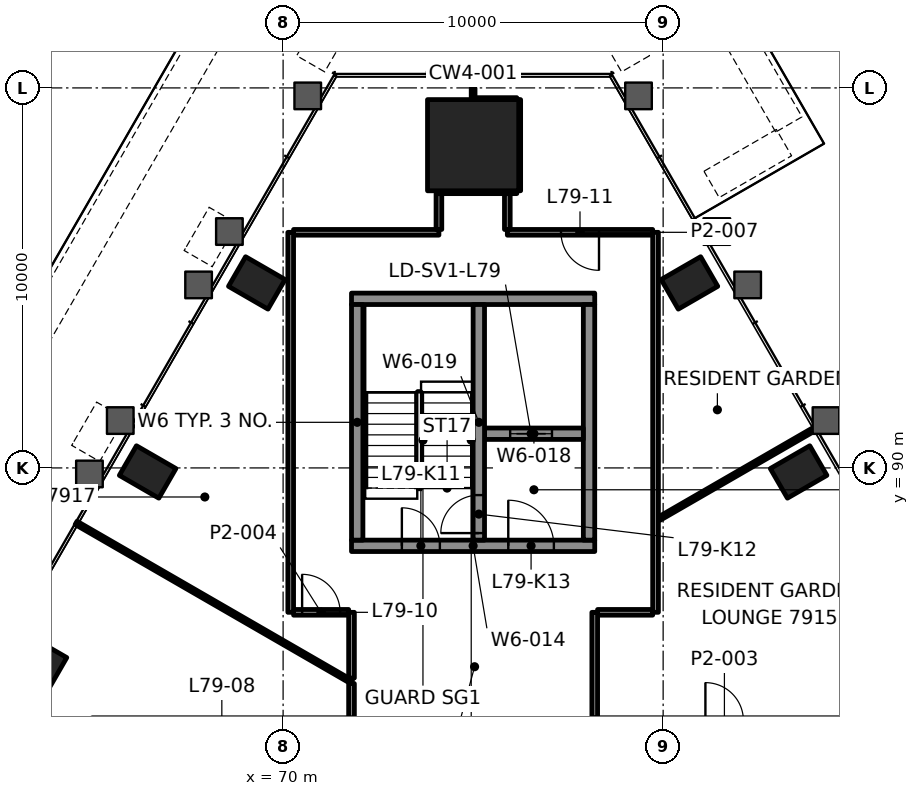
"""IFC4 building model, lengths in metres.
Left out: names, types, materials, properties, quantities, classifications, styles, units other than length and angle.
Written with IfcOpenShell. Run it as: python <this file> out.ifc"""

import sys

from ifc_helpers import new_model, si_unit, direction, frame, frame_2d, origin, origin_2d, place, context, subcontext, project, spatial, rectangle, hollow_rectangle, extrude, element, fill, save


model = new_model("IFC4")
c1 = context("Model", 3, precision=1e-05, world=origin(), true_north=direction((0.0, 1.0)))
c2 = subcontext(c1, "Body", "Model", "MODEL_VIEW")
j1 = project(units=[si_unit("LENGTHUNIT", "METRE"), si_unit("PLANEANGLEUNIT", "RADIAN")], contexts=[c1])
p1 = place(None, origin())
s1 = spatial("IfcSite", under=j1, at=p1, CompositionType="ELEMENT")
p2 = place(p1, origin())
s2 = spatial("IfcBuilding", under=s1, at=p2, CompositionType="ELEMENT")
p3 = place(p2, frame((0.0, 0.0, 323.1)))
s3 = spatial("IfcBuildingStorey", under=s2, at=p3, CompositionType="ELEMENT", Elevation=323.1)
p4 = place(p3, frame((75.0, 98.493, 0.0), z_axis=(0.0, 0.0, 1.0), x_axis=(-1.0, 0.0, 0.0)))
e1 = element("IfcColumn", 1, at=p4, inside=s3, PredefinedType="COLUMN", context=c2, shape_type="SweptSolid", body=[
    extrude(rectangle(XDim=2.4, YDim=2.4, at=origin_2d()), origin(), (0.0, 0.0, 1.0), 3.5),
])
for number, where, z_axis, x_axis in (
    (2, (83.565, 89.894, -0.0), (0.0, 0.0, 1.0), (-0.5, 0.866, 0.0)),
    (3, (80.693, 94.868, -0.0), (0.0, 0.0, 1.0), (-0.5, 0.866, 0.0)),
    (4, (69.307, 94.868, -0.0), (0.0, 0.0, 1.0), (-0.5, -0.866, 0.0)),
    (5, (66.435, 89.894, -0.0), (0.0, 0.0, 1.0), (-0.5, -0.866, 0.0)),
    (6, (63.563, 84.919, -0.0), (0.0, 0.0, 1.0), (-0.5, -0.866, 0.0)),
):
    element("IfcColumn", number, at=place(p3, frame(where, z_axis=z_axis, x_axis=x_axis)), inside=s3, PredefinedType="COLUMN", context=c2, shape_type="SweptSolid", body=[
        extrude(hollow_rectangle(XDim=0.9, YDim=1.2, WallThickness=0.06, at=origin_2d()), origin(), (0.0, 0.0, 1.0), 3.5),
    ])
p5 = place(p3, frame((71.8, 87.95, 0.0), z_axis=(0.0, 0.0, 1.0), x_axis=(1.0, 0.0, 0.0)))
e7 = element("IfcWall", 7, at=p5, inside=s3, PredefinedType="SHEAR", context=c2, shape_type="SweptSolid", body=[
    extrude(rectangle(XDim=6.4, YDim=0.3, at=frame_2d((3.2, 0.0))), origin(), (0.0, 0.0, 1.0), 3.2),
])
p6 = place(p5, frame((1.325, 0.0, 0.0)))
e8 = element("IfcOpeningElement", 8, at=p6, cuts=e7, PredefinedType="OPENING", context=c2, shape_type="SweptSolid", body=[
    extrude(rectangle(XDim=1.0, YDim=2.1, at=frame_2d((0.5, 1.05))), frame((0.0, 0.16, 0.0), z_axis=(0.0, -1.0, 0.0), x_axis=(1.0, 0.0, 0.0)), (0.0, 0.0, 1.0), 0.32),
])
p7 = place(p5, frame((4.125, 0.0, 0.0)))
e9 = element("IfcOpeningElement", 9, at=p7, cuts=e7, PredefinedType="OPENING", context=c2, shape_type="SweptSolid", body=[
    extrude(rectangle(XDim=1.2, YDim=2.1, at=frame_2d((0.6, 1.05))), frame((0.0, 0.16, 0.0), z_axis=(0.0, -1.0, 0.0), x_axis=(1.0, 0.0, 0.0)), (0.0, 0.0, 1.0), 0.32),
])
p8 = place(p3, frame((71.8, 94.45, 0.0), z_axis=(0.0, 0.0, 1.0), x_axis=(1.0, 0.0, 0.0)))
e10 = element("IfcWall", 10, at=p8, inside=s3, PredefinedType="SHEAR", context=c2, shape_type="SweptSolid", body=[
    extrude(rectangle(XDim=6.4, YDim=0.3, at=frame_2d((3.2, 0.0))), origin(), (0.0, 0.0, 1.0), 3.2),
])
for number, where, z_axis, x_axis in (
    (11, (71.95, 88.1, 0.0), (0.0, 0.0, 1.0), (0.0, 1.0, 0.0)),
    (12, (78.05, 88.1, 0.0), (0.0, 0.0, 1.0), (0.0, 1.0, 0.0)),
):
    element("IfcWall", number, at=place(p3, frame(where, z_axis=z_axis, x_axis=x_axis)), inside=s3, PredefinedType="SHEAR", context=c2, shape_type="SweptSolid", body=[
        extrude(rectangle(XDim=6.2, YDim=0.3, at=frame_2d((3.1, 0.0))), origin(), (0.0, 0.0, 1.0), 3.2),
    ])
p9 = place(p3, frame((75.3, 90.9, 0.0), z_axis=(0.0, 0.0, 1.0), x_axis=(1.0, 0.0, 0.0)))
e13 = element("IfcWall", 13, at=p9, inside=s3, PredefinedType="SHEAR", context=c2, shape_type="SweptSolid", body=[
    extrude(rectangle(XDim=2.6, YDim=0.3, at=frame_2d((1.3, 0.0))), origin(), (0.0, 0.0, 1.0), 3.2),
])
p10 = place(p9, frame((0.675, 0.0, 0.0)))
e14 = element("IfcOpeningElement", 14, at=p10, cuts=e13, PredefinedType="OPENING", context=c2, shape_type="SweptSolid", body=[
    extrude(rectangle(XDim=1.1, YDim=2.1, at=frame_2d((0.55, 1.05))), frame((0.0, 0.16, 0.0), z_axis=(0.0, -1.0, 0.0), x_axis=(1.0, 0.0, 0.0)), (0.0, 0.0, 1.0), 0.32),
])
p11 = place(p3, frame((75.15, 88.1, 0.0), z_axis=(0.0, 0.0, 1.0), x_axis=(0.0, 1.0, 0.0)))
e15 = element("IfcWall", 15, at=p11, inside=s3, PredefinedType="SHEAR", context=c2, shape_type="SweptSolid", body=[
    extrude(rectangle(XDim=6.2, YDim=0.3, at=frame_2d((3.1, 0.0))), origin(), (0.0, 0.0, 1.0), 3.2),
])
p12 = place(p11, frame((0.185, 0.0, 0.0)))
e16 = element("IfcOpeningElement", 16, at=p12, cuts=e15, PredefinedType="OPENING", context=c2, shape_type="SweptSolid", body=[
    extrude(rectangle(XDim=1.0, YDim=2.1, at=frame_2d((0.5, 1.05))), frame((0.0, 0.16, 0.0), z_axis=(0.0, -1.0, 0.0), x_axis=(1.0, 0.0, 0.0)), (0.0, 0.0, 1.0), 0.32),
])
p13 = place(p3, frame((70.276, 86.2, 0.0), z_axis=(0.0, 0.0, 1.0), x_axis=(1.0, 0.0, 0.0)))
e17 = element("IfcWall", 17, at=p13, inside=s3, PredefinedType="PARTITIONING", context=c2, shape_type="SweptSolid", body=[
    extrude(rectangle(XDim=1.449, YDim=0.15, at=frame_2d((0.725, 0.0))), origin(), (0.0, 0.0, 1.0), 2.6),
])
p14 = place(p13, frame((0.225, 0.0, 0.0)))
e18 = element("IfcOpeningElement", 18, at=p14, cuts=e17, PredefinedType="OPENING", context=c2, shape_type="SweptSolid", body=[
    extrude(rectangle(XDim=1.0, YDim=2.1, at=frame_2d((0.5, 1.05))), frame((0.0, 0.085, 0.0), z_axis=(0.0, -1.0, 0.0), x_axis=(1.0, 0.0, 0.0)), (0.0, 0.0, 1.0), 0.17),
])
p15 = place(p3, frame((78.275, 86.2, 0.0), z_axis=(0.0, 0.0, 1.0), x_axis=(1.0, 0.0, 0.0)))
e19 = element("IfcWall", 19, at=p15, inside=s3, PredefinedType="PARTITIONING", context=c2, shape_type="SweptSolid", body=[
    extrude(rectangle(XDim=1.449, YDim=0.15, at=frame_2d((0.725, 0.0))), origin(), (0.0, 0.0, 1.0), 2.6),
])
p16 = place(p3, frame((70.276, 96.2, 0.0), z_axis=(0.0, 0.0, 1.0), x_axis=(1.0, 0.0, 0.0)))
e20 = element("IfcWall", 20, at=p16, inside=s3, PredefinedType="PARTITIONING", context=c2, shape_type="SweptSolid", body=[
    extrude(rectangle(XDim=3.824, YDim=0.15, at=frame_2d((1.912, 0.0))), origin(), (0.0, 0.0, 1.0), 2.6),
])
p17 = place(p3, frame((79.725, 96.2, 0.0), z_axis=(0.0, 0.0, 1.0), x_axis=(-1.0, 0.0, 0.0)))
e21 = element("IfcWall", 21, at=p17, inside=s3, PredefinedType="PARTITIONING", context=c2, shape_type="SweptSolid", body=[
    extrude(rectangle(XDim=3.825, YDim=0.15, at=frame_2d((1.912, 0.0))), origin(), (0.0, 0.0, 1.0), 2.6),
])
p18 = place(p17, frame((1.412, 0.0, 0.0)))
e22 = element("IfcOpeningElement", 22, at=p18, cuts=e21, PredefinedType="OPENING", context=c2, shape_type="SweptSolid", body=[
    extrude(rectangle(XDim=1.0, YDim=2.1, at=frame_2d((0.5, 1.05))), frame((0.0, 0.085, 0.0), z_axis=(0.0, -1.0, 0.0), x_axis=(1.0, 0.0, 0.0)), (0.0, 0.0, 1.0), 0.17),
])
p19 = place(p3, frame((74.101, 97.293, 0.0), z_axis=(0.0, 0.0, 1.0), x_axis=(1.0, 0.0, 0.0)))
e23 = element("IfcWall", 23, at=p19, inside=s3, PredefinedType="PARTITIONING", context=c2, shape_type="SweptSolid", body=[
    extrude(rectangle(XDim=2.049, YDim=0.15, at=frame_2d((1.024, 0.0))), origin(), (0.0, 0.0, 1.0), 2.597),
])
p20 = place(p3, frame((75.0, 99.693, 0.0), z_axis=(0.0, 0.0, 1.0), x_axis=(1.0, 0.0, 0.0)))
e24 = element("IfcWall", 24, at=p20, inside=s3, PredefinedType="PARTITIONING", context=c2, shape_type="SweptSolid", body=[
    extrude(rectangle(XDim=1.149, YDim=0.1, at=frame_2d((0.574, 0.0))), origin(), (0.0, 0.0, 1.0), 2.6),
])
p21 = place(p3, frame((79.901, 88.668, 0.0), z_axis=(0.0, 0.0, 1.0), x_axis=(0.866040813102, 0.499973309328, 0.0)))
e25 = element("IfcWall", 25, at=p21, inside=s3, PredefinedType="PARTITIONING", context=c2, shape_type="SweptSolid", body=[
    extrude(rectangle(XDim=4.746, YDim=0.1, at=frame_2d((2.373, 0.0))), origin(), (0.0, 0.0, 1.0), 2.6),
])
p22 = place(p3, frame((79.8, 86.2, 0.0), z_axis=(0.0, 0.0, 1.0), x_axis=(0.0, 1.0, 0.0)))
e26 = element("IfcWall", 26, at=p22, inside=s3, PredefinedType="PARTITIONING", context=c2, shape_type="SweptSolid", body=[
    extrude(rectangle(XDim=9.999, YDim=0.15, at=frame_2d((5.0, 0.0))), origin(), (0.0, 0.0, 1.0), 2.6),
])
p23 = place(p3, frame((78.2, 83.425, 0.0), z_axis=(0.0, 0.0, 1.0), x_axis=(0.0, 1.0, 0.0)))
e27 = element("IfcWall", 27, at=p23, inside=s3, PredefinedType="PARTITIONING", context=c2, shape_type="SweptSolid", body=[
    extrude(rectangle(XDim=2.775, YDim=0.15, at=frame_2d((1.387, 0.0))), origin(), (0.0, 0.0, 1.0), 2.6),
])
p24 = place(p3, frame((76.2, 97.293, 0.0), z_axis=(0.0, 0.0, 1.0), x_axis=(0.0, 1.0, 0.0)))
e28 = element("IfcWall", 28, at=p24, inside=s3, PredefinedType="PARTITIONING", context=c2, shape_type="SweptSolid", body=[
    extrude(rectangle(XDim=2.399, YDim=0.1, at=frame_2d((1.2, 0.0))), origin(), (0.0, 0.0, 1.0), 2.6),
])
p25 = place(p3, frame((75.9, 96.275, 0.0), z_axis=(0.0, 0.0, 1.0), x_axis=(0.0, 1.0, 0.0)))
e29 = element("IfcWall", 29, at=p25, inside=s3, PredefinedType="PARTITIONING", context=c2, shape_type="SweptSolid", body=[
    extrude(rectangle(XDim=0.943, YDim=0.15, at=frame_2d((0.471, 0.0))), origin(), (0.0, 0.0, 1.0), 2.6),
])
p26 = place(p3, frame((75.0, 99.743, 0.0), z_axis=(0.0, 0.0, 1.0), x_axis=(0.0, 1.0, 0.0)))
e30 = element("IfcWall", 30, at=p26, inside=s3, PredefinedType="PARTITIONING", context=c2, shape_type="SweptSolid", body=[
    extrude(rectangle(XDim=0.249, YDim=0.1, at=frame_2d((0.125, 0.0))), origin(), (0.0, 0.0, 1.0), 2.6),
])
p27 = place(p3, frame((74.1, 96.275, 0.0), z_axis=(0.0, 0.0, 1.0), x_axis=(0.0, 1.0, 0.0)))
e31 = element("IfcWall", 31, at=p27, inside=s3, PredefinedType="PARTITIONING", context=c2, shape_type="SweptSolid", body=[
    extrude(rectangle(XDim=0.942, YDim=0.15, at=frame_2d((0.471, 0.0))), origin(), (0.0, 0.0, 1.0), 2.6),
])
p28 = place(p3, frame((71.8, 83.425, 0.0), z_axis=(0.0, 0.0, 1.0), x_axis=(0.0, 1.0, 0.0)))
e32 = element("IfcWall", 32, at=p28, inside=s3, PredefinedType="PARTITIONING", context=c2, shape_type="SweptSolid", body=[
    extrude(rectangle(XDim=0.901, YDim=0.15, at=frame_2d((0.451, 0.0))), origin(), (0.0, 0.0, 1.0), 2.6),
])
p29 = place(p3, frame((70.2, 86.2, 0.0), z_axis=(0.0, 0.0, 1.0), x_axis=(0.0, 1.0, 0.0)))
e33 = element("IfcWall", 33, at=p29, inside=s3, PredefinedType="PARTITIONING", context=c2, shape_type="SweptSolid", body=[
    extrude(rectangle(XDim=9.999, YDim=0.15, at=frame_2d((5.0, 0.0))), origin(), (0.0, 0.0, 1.0), 2.6),
])
p30 = place(p3, frame((71.8, 84.369, 0.0), z_axis=(0.0, 0.0, 1.0), x_axis=(-0.866026229868, 0.499998569178, 0.0)))
e34 = element("IfcWall", 34, at=p30, inside=s3, PredefinedType="PARTITIONING", context=c2, shape_type="SweptSolid", body=[
    extrude(rectangle(XDim=8.368, YDim=0.1, at=frame_2d((4.184, 0.0))), origin(), (0.0, 0.0, 1.0), 2.588),
])
p31 = place(p3, frame((71.8, 84.47, 0.0), z_axis=(0.0, 0.0, 1.0), x_axis=(0.0, 1.0, 0.0)))
e35 = element("IfcWall", 35, at=p31, inside=s3, PredefinedType="PARTITIONING", context=c2, shape_type="SweptSolid", body=[
    extrude(rectangle(XDim=1.729, YDim=0.15, at=frame_2d((0.865, 0.0))), origin(), (0.0, 0.0, 1.0), 2.6),
])
p32 = place(p3, frame((81.274, 97.46, 0.0), z_axis=(0.0, 0.0, 1.0), x_axis=(0.866008176907, 0.50002983664, 0.0)))
e36 = element("IfcWall", 36, at=p32, inside=s3, PredefinedType="SOLIDWALL", context=c2, shape_type="SweptSolid", body=[
    extrude(rectangle(XDim=2.2, YDim=0.8, at=frame_2d((1.1, 0.0))), origin(), (0.0, 0.0, 1.0), 0.9),
])
p33 = place(p3, frame((83.308, 99.038, 0.0), z_axis=(0.0, 0.0, 1.0), x_axis=(-0.500015883528, 0.866016233231, 0.0)))
e37 = element("IfcWall", 37, at=p33, inside=s3, PredefinedType="SOLIDWALL", context=c2, shape_type="SweptSolid", body=[
    extrude(rectangle(XDim=4.849, YDim=0.8, at=frame_2d((2.425, 0.0))), origin(), (0.0, 0.0, 1.0), 0.9),
])
p34 = place(p3, frame((69.117, 103.238, 0.0), z_axis=(0.0, 0.0, 1.0), x_axis=(-0.500001437611, -0.866024573778, 0.0)))
e38 = element("IfcWall", 38, at=p34, inside=s3, PredefinedType="SOLIDWALL", context=c2, shape_type="SweptSolid", body=[
    extrude(rectangle(XDim=43.027, YDim=0.8, at=frame_2d((21.513, 0.0))), origin(), (0.0, 0.0, 1.0), 0.9),
])
p35 = place(p14, origin())
e39 = element("IfcDoor", 39, at=p35, inside=s3, OperationType="SINGLE_SWING_RIGHT", PredefinedType="DOOR", context=c2, shape_type="SweptSolid", body=[
    extrude(rectangle(XDim=1.0, YDim=2.1, at=frame_2d((0.5, 1.05))), frame((0.0, 0.025, 0.0), z_axis=(0.0, -1.0, 0.0), x_axis=(1.0, 0.0, 0.0)), (0.0, 0.0, 1.0), 0.05),
])
fill(e18, e39)
p36 = place(p18, origin())
e40 = element("IfcDoor", 40, at=p36, inside=s3, OperationType="SINGLE_SWING_RIGHT", PredefinedType="DOOR", context=c2, shape_type="SweptSolid", body=[
    extrude(rectangle(XDim=1.0, YDim=2.1, at=frame_2d((0.5, 1.05))), frame((0.0, 0.025, 0.0), z_axis=(0.0, -1.0, 0.0), x_axis=(1.0, 0.0, 0.0)), (0.0, 0.0, 1.0), 0.05),
])
fill(e22, e40)
p37 = place(p10, origin())
e41 = element("IfcDoor", 41, at=p37, inside=s3, OperationType="DOUBLE_DOOR_SLIDING", PredefinedType="DOOR", context=c2, shape_type="SweptSolid", body=[
    extrude(rectangle(XDim=1.1, YDim=2.1, at=frame_2d((0.55, 1.05))), frame((0.0, 0.025, 0.0), z_axis=(0.0, -1.0, 0.0), x_axis=(1.0, 0.0, 0.0)), (0.0, 0.0, 1.0), 0.05),
])
fill(e14, e41)
p38 = place(p6, origin())
e42 = element("IfcDoor", 42, at=p38, inside=s3, OperationType="SINGLE_SWING_RIGHT", PredefinedType="DOOR", context=c2, shape_type="SweptSolid", body=[
    extrude(rectangle(XDim=1.0, YDim=2.1, at=frame_2d((0.5, 1.05))), frame((0.0, 0.025, 0.0), z_axis=(0.0, -1.0, 0.0), x_axis=(1.0, 0.0, 0.0)), (0.0, 0.0, 1.0), 0.05),
])
fill(e8, e42)
p39 = place(p12, origin())
e43 = element("IfcDoor", 43, at=p39, inside=s3, OperationType="SINGLE_SWING_LEFT", PredefinedType="DOOR", context=c2, shape_type="SweptSolid", body=[
    extrude(rectangle(XDim=1.0, YDim=2.1, at=frame_2d((0.5, 1.05))), frame((0.0, 0.025, 0.0), z_axis=(0.0, -1.0, 0.0), x_axis=(1.0, 0.0, 0.0)), (0.0, 0.0, 1.0), 0.05),
])
fill(e16, e43)
p40 = place(p7, origin())
e44 = element("IfcDoor", 44, at=p40, inside=s3, OperationType="SINGLE_SWING_RIGHT", PredefinedType="DOOR", context=c2, shape_type="SweptSolid", body=[
    extrude(rectangle(XDim=1.2, YDim=2.1, at=frame_2d((0.6, 1.05))), frame((0.0, 0.025, 0.0), z_axis=(0.0, -1.0, 0.0), x_axis=(1.0, 0.0, 0.0)), (0.0, 0.0, 1.0), 0.05),
])
fill(e9, e44)
save(model, sys.argv[1])
